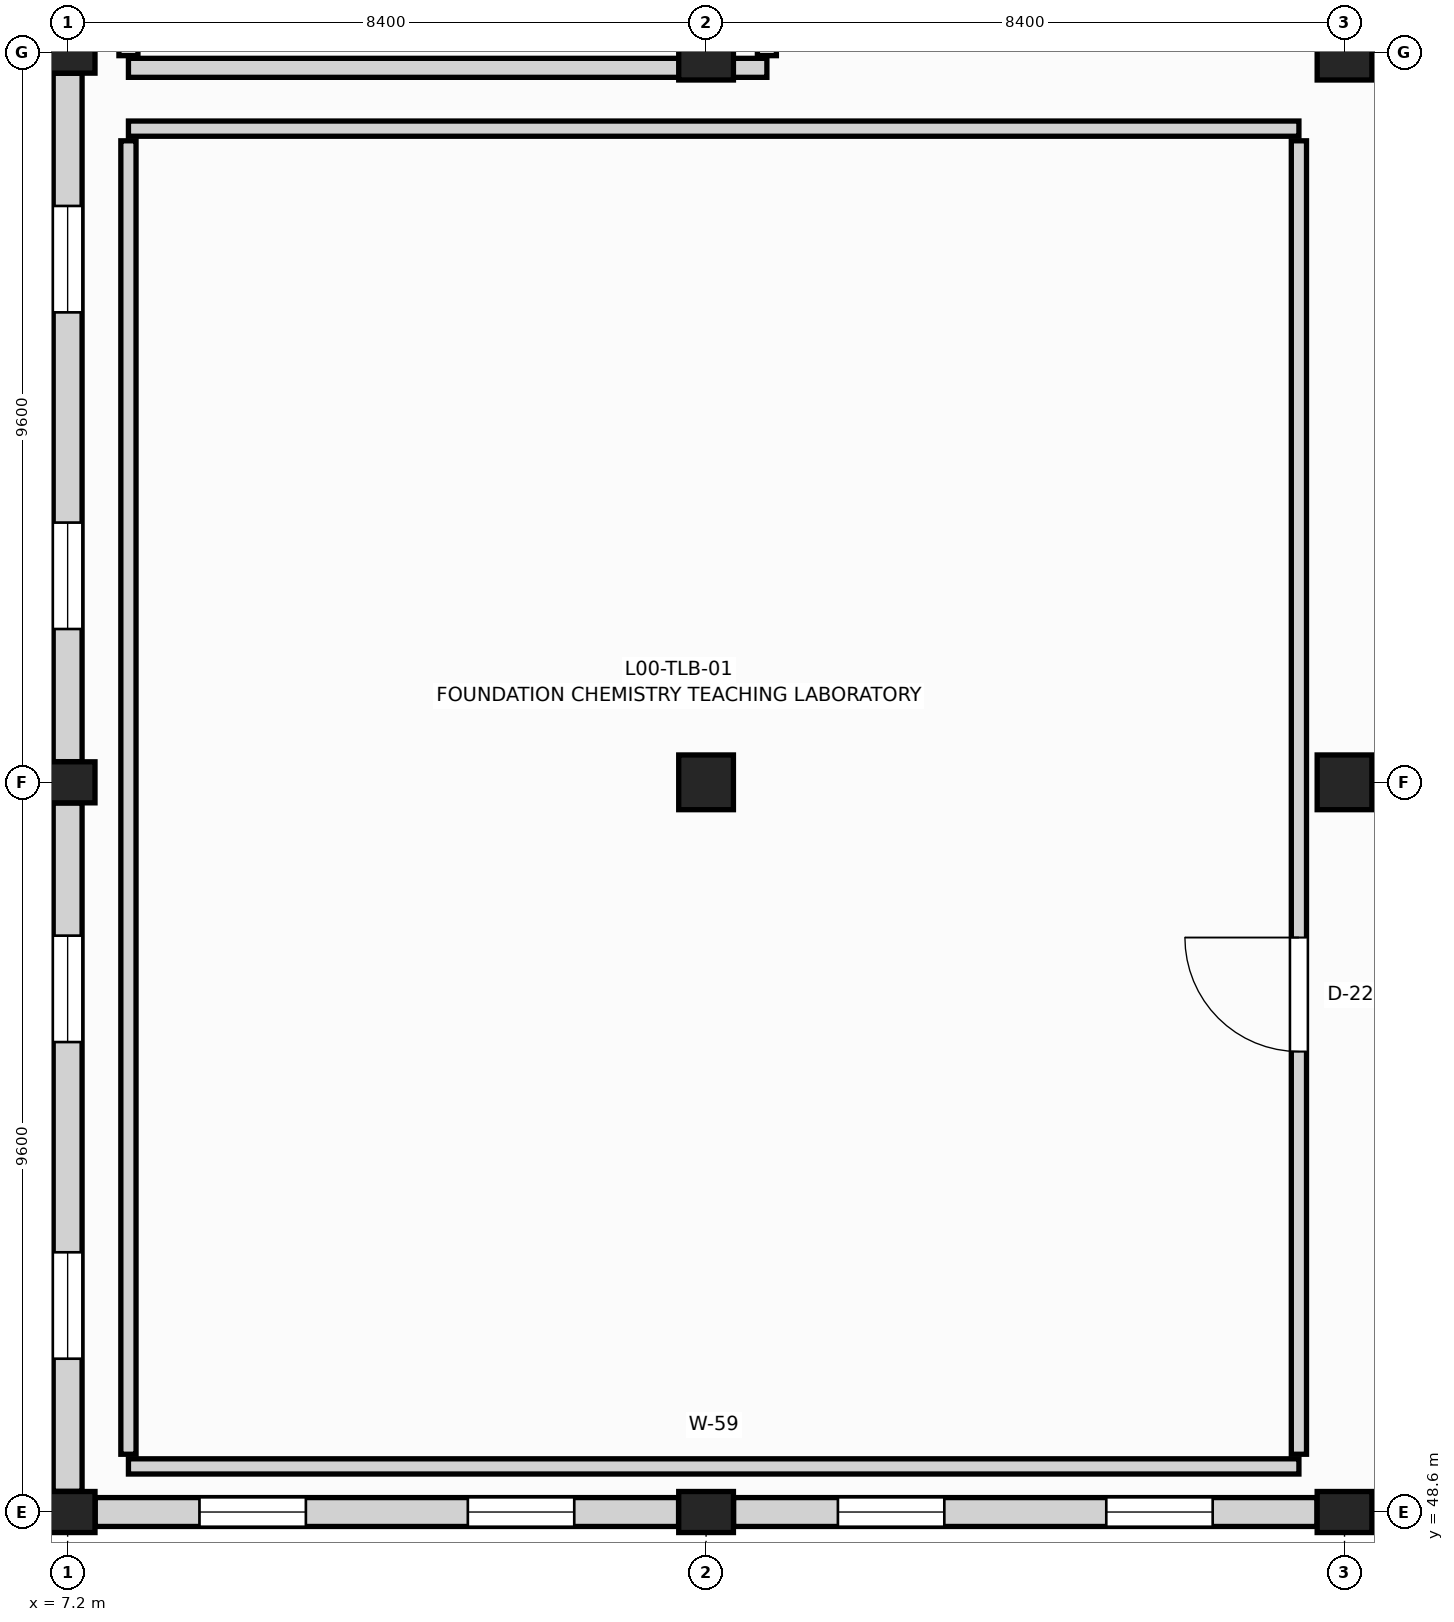
"""IFC4 building model, lengths in metres.
Left out: names, types, materials, properties, quantities, classifications, styles, units other than length and angle.
Written with IfcOpenShell. Run it as: python <this file> out.ifc"""

import sys

from ifc_helpers import new_model, si_unit, direction, frame, frame_2d, origin, origin_2d, place, context, subcontext, project, spatial, rectangle, extrude, element, fill, save


model = new_model("IFC4")
c1 = context("Model", 3, precision=1e-05, world=origin(), true_north=direction((0.0, 1.0)))
c2 = subcontext(c1, "Body", "Model", "MODEL_VIEW")
j1 = project(units=[si_unit("LENGTHUNIT", "METRE"), si_unit("PLANEANGLEUNIT", "RADIAN")], contexts=[c1])
p1 = place(None, origin())
s1 = spatial("IfcSite", under=j1, at=p1, CompositionType="ELEMENT")
p2 = place(p1, origin())
s2 = spatial("IfcBuilding", under=s1, at=p2, CompositionType="ELEMENT")
p3 = place(p2, origin())
s3 = spatial("IfcBuildingStorey", under=s2, at=p3, CompositionType="ELEMENT", Elevation=0.0)
for number, where, z_axis, x_axis in (
    (1, (7.2, 48.6, 0.0), (0.0, 0.0, 1.0), (1.0, 0.0, 0.0)),
    (2, (7.2, 58.2, 0.0), (0.0, 0.0, 1.0), (1.0, 0.0, 0.0)),
    (3, (7.2, 67.8, 0.0), (0.0, 0.0, 1.0), (1.0, 0.0, 0.0)),
    (4, (15.6, 48.6, 0.0), (0.0, 0.0, 1.0), (1.0, 0.0, 0.0)),
):
    element("IfcColumn", number, at=place(p3, frame(where, z_axis=z_axis, x_axis=x_axis)), inside=s3, PredefinedType="COLUMN", context=c2, shape_type="SweptSolid", body=[
        extrude(rectangle(XDim=0.72, YDim=0.54, at=origin_2d()), origin(), (0.0, 0.0, 1.0), 5.08),
    ])
for number, where, z_axis, x_axis in (
    (5, (15.6, 58.2, 0.0), (0.0, 0.0, 1.0), (1.0, 0.0, 0.0)),
    (6, (15.6, 67.8, 0.0), (0.0, 0.0, 1.0), (1.0, 0.0, 0.0)),
):
    element("IfcColumn", number, at=place(p3, frame(where, z_axis=z_axis, x_axis=x_axis)), inside=s3, PredefinedType="COLUMN", context=c2, shape_type="SweptSolid", body=[
        extrude(rectangle(XDim=0.72, YDim=0.72, at=origin_2d()), origin(), (0.0, 0.0, 1.0), 5.08),
    ])
p4 = place(p3, frame((24.0, 48.6, 0.0), z_axis=(0.0, 0.0, 1.0), x_axis=(1.0, 0.0, 0.0)))
e7 = element("IfcColumn", 7, at=p4, inside=s3, PredefinedType="COLUMN", context=c2, shape_type="SweptSolid", body=[
    extrude(rectangle(XDim=0.72, YDim=0.54, at=origin_2d()), origin(), (0.0, 0.0, 1.0), 5.08),
])
for number, where, z_axis, x_axis in (
    (8, (24.0, 58.2, 0.0), (0.0, 0.0, 1.0), (1.0, 0.0, 0.0)),
    (9, (24.0, 67.8, 0.0), (0.0, 0.0, 1.0), (1.0, 0.0, 0.0)),
):
    element("IfcColumn", number, at=place(p3, frame(where, z_axis=z_axis, x_axis=x_axis)), inside=s3, PredefinedType="COLUMN", context=c2, shape_type="SweptSolid", body=[
        extrude(rectangle(XDim=0.72, YDim=0.72, at=origin_2d()), origin(), (0.0, 0.0, 1.0), 5.08),
    ])
p5 = place(p3, frame((7.562, 48.6, 0.0), z_axis=(0.0, 0.0, 1.0), x_axis=(1.0, 0.0, 0.0)))
e10 = element("IfcWall", 10, at=p5, inside=s3, PredefinedType="SOLIDWALL", context=c2, shape_type="SweptSolid", body=[
    extrude(rectangle(XDim=7.676, YDim=0.38, at=frame_2d((3.838, 0.0))), origin(), (0.0, 0.0, 1.0), 4.28),
])
p6 = place(p5, frame((1.373, 0.0, 0.85)))
e11 = element("IfcOpeningElement", 11, at=p6, cuts=e10, PredefinedType="OPENING", context=c2, shape_type="SweptSolid", body=[
    extrude(rectangle(XDim=1.4, YDim=1.65, at=frame_2d((0.7, 0.825))), frame((0.0, 0.2, 0.0), z_axis=(0.0, -1.0, 0.0), x_axis=(1.0, 0.0, 0.0)), (0.0, 0.0, 1.0), 0.4),
])
p7 = place(p5, frame((4.904, 0.0, 0.85)))
e12 = element("IfcOpeningElement", 12, at=p7, cuts=e10, PredefinedType="OPENING", context=c2, shape_type="SweptSolid", body=[
    extrude(rectangle(XDim=1.4, YDim=1.65, at=frame_2d((0.7, 0.825))), frame((0.0, 0.2, 0.0), z_axis=(0.0, -1.0, 0.0), x_axis=(1.0, 0.0, 0.0)), (0.0, 0.0, 1.0), 0.4),
])
p8 = place(p3, frame((15.962, 48.6, 0.0), z_axis=(0.0, 0.0, 1.0), x_axis=(1.0, 0.0, 0.0)))
e13 = element("IfcWall", 13, at=p8, inside=s3, PredefinedType="SOLIDWALL", context=c2, shape_type="SweptSolid", body=[
    extrude(rectangle(XDim=7.676, YDim=0.38, at=frame_2d((3.838, 0.0))), origin(), (0.0, 0.0, 1.0), 4.28),
])
p9 = place(p8, frame((1.373, 0.0, 0.85)))
e14 = element("IfcOpeningElement", 14, at=p9, cuts=e13, PredefinedType="OPENING", context=c2, shape_type="SweptSolid", body=[
    extrude(rectangle(XDim=1.4, YDim=1.65, at=frame_2d((0.7, 0.825))), frame((0.0, 0.2, 0.0), z_axis=(0.0, -1.0, 0.0), x_axis=(1.0, 0.0, 0.0)), (0.0, 0.0, 1.0), 0.4),
])
p10 = place(p8, frame((4.904, 0.0, 0.85)))
e15 = element("IfcOpeningElement", 15, at=p10, cuts=e13, PredefinedType="OPENING", context=c2, shape_type="SweptSolid", body=[
    extrude(rectangle(XDim=1.4, YDim=1.65, at=frame_2d((0.7, 0.825))), frame((0.0, 0.2, 0.0), z_axis=(0.0, -1.0, 0.0), x_axis=(1.0, 0.0, 0.0)), (0.0, 0.0, 1.0), 0.4),
])
p11 = place(p3, frame((24.362, 48.6, 0.0), z_axis=(0.0, 0.0, 1.0), x_axis=(1.0, 0.0, 0.0)))
e16 = element("IfcWall", 16, at=p11, inside=s3, PredefinedType="SOLIDWALL", context=c2, shape_type="SweptSolid", body=[
    extrude(rectangle(XDim=7.676, YDim=0.38, at=frame_2d((3.838, 0.0))), origin(), (0.0, 0.0, 1.0), 4.28),
])
p12 = place(p11, frame((4.904, 0.0, 0.85)))
e17 = element("IfcOpeningElement", 17, at=p12, cuts=e16, PredefinedType="OPENING", context=c2, shape_type="SweptSolid", body=[
    extrude(rectangle(XDim=1.4, YDim=1.65, at=frame_2d((0.7, 0.825))), frame((0.0, 0.2, 0.0), z_axis=(0.0, -1.0, 0.0), x_axis=(1.0, 0.0, 0.0)), (0.0, 0.0, 1.0), 0.4),
])
p13 = place(p3, frame((7.2, 48.872, 0.0), z_axis=(0.0, 0.0, 1.0), x_axis=(0.0, 1.0, 0.0)))
e18 = element("IfcWall", 18, at=p13, inside=s3, PredefinedType="SOLIDWALL", context=c2, shape_type="SweptSolid", body=[
    extrude(rectangle(XDim=9.056, YDim=0.38, at=frame_2d((4.528, 0.0))), origin(), (0.0, 0.0, 1.0), 4.28),
])
p14 = place(p13, frame((1.745, 0.0, 0.85)))
e19 = element("IfcOpeningElement", 19, at=p14, cuts=e18, PredefinedType="OPENING", context=c2, shape_type="SweptSolid", body=[
    extrude(rectangle(XDim=1.4, YDim=1.65, at=frame_2d((0.7, 0.825))), frame((0.0, 0.2, 0.0), z_axis=(0.0, -1.0, 0.0), x_axis=(1.0, 0.0, 0.0)), (0.0, 0.0, 1.0), 0.4),
])
p15 = place(p13, frame((5.911, 0.0, 0.85)))
e20 = element("IfcOpeningElement", 20, at=p15, cuts=e18, PredefinedType="OPENING", context=c2, shape_type="SweptSolid", body=[
    extrude(rectangle(XDim=1.4, YDim=1.65, at=frame_2d((0.7, 0.825))), frame((0.0, 0.2, 0.0), z_axis=(0.0, -1.0, 0.0), x_axis=(1.0, 0.0, 0.0)), (0.0, 0.0, 1.0), 0.4),
])
p16 = place(p3, frame((7.2, 58.472, 0.0), z_axis=(0.0, 0.0, 1.0), x_axis=(0.0, 1.0, 0.0)))
e21 = element("IfcWall", 21, at=p16, inside=s3, PredefinedType="SOLIDWALL", context=c2, shape_type="SweptSolid", body=[
    extrude(rectangle(XDim=9.056, YDim=0.38, at=frame_2d((4.528, 0.0))), origin(), (0.0, 0.0, 1.0), 4.28),
])
p17 = place(p16, frame((1.745, 0.0, 0.85)))
e22 = element("IfcOpeningElement", 22, at=p17, cuts=e21, PredefinedType="OPENING", context=c2, shape_type="SweptSolid", body=[
    extrude(rectangle(XDim=1.4, YDim=1.65, at=frame_2d((0.7, 0.825))), frame((0.0, 0.2, 0.0), z_axis=(0.0, -1.0, 0.0), x_axis=(1.0, 0.0, 0.0)), (0.0, 0.0, 1.0), 0.4),
])
p18 = place(p16, frame((5.911, 0.0, 0.85)))
e23 = element("IfcOpeningElement", 23, at=p18, cuts=e21, PredefinedType="OPENING", context=c2, shape_type="SweptSolid", body=[
    extrude(rectangle(XDim=1.4, YDim=1.65, at=frame_2d((0.7, 0.825))), frame((0.0, 0.2, 0.0), z_axis=(0.0, -1.0, 0.0), x_axis=(1.0, 0.0, 0.0)), (0.0, 0.0, 1.0), 0.4),
])
for number, where, z_axis, x_axis in (
    (24, (8.0, 49.2, 0.0), (0.0, 0.0, 1.0), (1.0, 0.0, 0.0)),
    (25, (8.0, 66.8, 0.0), (0.0, 0.0, 1.0), (1.0, 0.0, 0.0)),
):
    element("IfcWall", number, at=place(p3, frame(where, z_axis=z_axis, x_axis=x_axis)), inside=s3, PredefinedType="PARTITIONING", context=c2, shape_type="SweptSolid", body=[
        extrude(rectangle(XDim=15.4, YDim=0.2, at=frame_2d((7.7, 0.0))), origin(), (0.0, 0.0, 1.0), 4.12),
    ])
p19 = place(p3, frame((8.0, 49.36, 0.0), z_axis=(0.0, 0.0, 1.0), x_axis=(0.0, 1.0, 0.0)))
e26 = element("IfcWall", 26, at=p19, inside=s3, PredefinedType="PARTITIONING", context=c2, shape_type="SweptSolid", body=[
    extrude(rectangle(XDim=17.28, YDim=0.2, at=frame_2d((8.64, 0.0))), origin(), (0.0, 0.0, 1.0), 4.12),
])
p20 = place(p3, frame((23.4, 49.36, 0.0), z_axis=(0.0, 0.0, 1.0), x_axis=(0.0, 1.0, 0.0)))
e27 = element("IfcWall", 27, at=p20, inside=s3, PredefinedType="PARTITIONING", context=c2, shape_type="SweptSolid", body=[
    extrude(rectangle(XDim=17.28, YDim=0.2, at=frame_2d((8.64, 0.0))), origin(), (0.0, 0.0, 1.0), 4.12),
])
p21 = place(p20, frame((5.298, 0.0, 0.0)))
e28 = element("IfcOpeningElement", 28, at=p21, cuts=e27, PredefinedType="OPENING", context=c2, shape_type="SweptSolid", body=[
    extrude(rectangle(XDim=1.5, YDim=2.2, at=frame_2d((0.75, 1.1))), frame((0.0, 0.11, 0.0), z_axis=(0.0, -1.0, 0.0), x_axis=(1.0, 0.0, 0.0)), (0.0, 0.0, 1.0), 0.22),
])
p22 = place(p3, frame((8.0, 67.6, 0.0), z_axis=(0.0, 0.0, 1.0), x_axis=(1.0, 0.0, 0.0)))
e29 = element("IfcWall", 29, at=p22, inside=s3, PredefinedType="PARTITIONING", context=c2, shape_type="SweptSolid", body=[
    extrude(rectangle(XDim=8.4, YDim=0.25, at=frame_2d((4.2, 0.0))), origin(), (0.0, 0.0, 1.0), 4.12),
])
p23 = place(p3, frame((8.0, 67.76, 0.0), z_axis=(0.0, 0.0, 1.0), x_axis=(0.0, 1.0, 0.0)))
e30 = element("IfcWall", 30, at=p23, inside=s3, PredefinedType="PARTITIONING", context=c2, shape_type="SweptSolid", body=[
    extrude(rectangle(XDim=18.28, YDim=0.25, at=frame_2d((9.14, 0.0))), origin(), (0.0, 0.0, 1.0), 4.12),
])
p24 = place(p3, frame((16.4, 67.76, 0.0), z_axis=(0.0, 0.0, 1.0), x_axis=(0.0, 1.0, 0.0)))
e31 = element("IfcWall", 31, at=p24, inside=s3, PredefinedType="PARTITIONING", context=c2, shape_type="SweptSolid", body=[
    extrude(rectangle(XDim=18.28, YDim=0.25, at=frame_2d((9.14, 0.0))), origin(), (0.0, 0.0, 1.0), 4.12),
])
p25 = place(p24, frame((5.598, 0.0, 0.0)))
e32 = element("IfcOpeningElement", 32, at=p25, cuts=e31, PredefinedType="OPENING", context=c2, shape_type="SweptSolid", body=[
    extrude(rectangle(XDim=1.6, YDim=2.3, at=frame_2d((0.8, 1.15))), frame((0.0, 0.135, 0.0), z_axis=(0.0, -1.0, 0.0), x_axis=(1.0, 0.0, 0.0)), (0.0, 0.0, 1.0), 0.27),
])
p26 = place(p6, origin())
e33 = element("IfcWindow", 33, at=p26, inside=s3, PartitioningType="SINGLE_PANEL", PredefinedType="WINDOW", context=c2, shape_type="SweptSolid", body=[
    extrude(rectangle(XDim=1.4, YDim=1.65, at=frame_2d((0.7, 0.825))), frame((0.0, 0.03, 0.0), z_axis=(0.0, -1.0, 0.0), x_axis=(1.0, 0.0, 0.0)), (0.0, 0.0, 1.0), 0.06),
])
fill(e11, e33)
p27 = place(p7, origin())
e34 = element("IfcWindow", 34, at=p27, inside=s3, PartitioningType="SINGLE_PANEL", PredefinedType="WINDOW", context=c2, shape_type="SweptSolid", body=[
    extrude(rectangle(XDim=1.4, YDim=1.65, at=frame_2d((0.7, 0.825))), frame((0.0, 0.03, 0.0), z_axis=(0.0, -1.0, 0.0), x_axis=(1.0, 0.0, 0.0)), (0.0, 0.0, 1.0), 0.06),
])
fill(e12, e34)
p28 = place(p9, origin())
e35 = element("IfcWindow", 35, at=p28, inside=s3, PartitioningType="SINGLE_PANEL", PredefinedType="WINDOW", context=c2, shape_type="SweptSolid", body=[
    extrude(rectangle(XDim=1.4, YDim=1.65, at=frame_2d((0.7, 0.825))), frame((0.0, 0.03, 0.0), z_axis=(0.0, -1.0, 0.0), x_axis=(1.0, 0.0, 0.0)), (0.0, 0.0, 1.0), 0.06),
])
fill(e14, e35)
p29 = place(p10, origin())
e36 = element("IfcWindow", 36, at=p29, inside=s3, PartitioningType="SINGLE_PANEL", PredefinedType="WINDOW", context=c2, shape_type="SweptSolid", body=[
    extrude(rectangle(XDim=1.4, YDim=1.65, at=frame_2d((0.7, 0.825))), frame((0.0, 0.03, 0.0), z_axis=(0.0, -1.0, 0.0), x_axis=(1.0, 0.0, 0.0)), (0.0, 0.0, 1.0), 0.06),
])
fill(e15, e36)
p30 = place(p14, origin())
e37 = element("IfcWindow", 37, at=p30, inside=s3, PartitioningType="SINGLE_PANEL", PredefinedType="WINDOW", context=c2, shape_type="SweptSolid", body=[
    extrude(rectangle(XDim=1.4, YDim=1.65, at=frame_2d((0.7, 0.825))), frame((0.0, 0.03, 0.0), z_axis=(0.0, -1.0, 0.0), x_axis=(1.0, 0.0, 0.0)), (0.0, 0.0, 1.0), 0.06),
])
fill(e19, e37)
p31 = place(p15, origin())
e38 = element("IfcWindow", 38, at=p31, inside=s3, PartitioningType="SINGLE_PANEL", PredefinedType="WINDOW", context=c2, shape_type="SweptSolid", body=[
    extrude(rectangle(XDim=1.4, YDim=1.65, at=frame_2d((0.7, 0.825))), frame((0.0, 0.03, 0.0), z_axis=(0.0, -1.0, 0.0), x_axis=(1.0, 0.0, 0.0)), (0.0, 0.0, 1.0), 0.06),
])
fill(e20, e38)
p32 = place(p17, origin())
e39 = element("IfcWindow", 39, at=p32, inside=s3, PartitioningType="SINGLE_PANEL", PredefinedType="WINDOW", context=c2, shape_type="SweptSolid", body=[
    extrude(rectangle(XDim=1.4, YDim=1.65, at=frame_2d((0.7, 0.825))), frame((0.0, 0.03, 0.0), z_axis=(0.0, -1.0, 0.0), x_axis=(1.0, 0.0, 0.0)), (0.0, 0.0, 1.0), 0.06),
])
fill(e22, e39)
p33 = place(p18, origin())
e40 = element("IfcWindow", 40, at=p33, inside=s3, PartitioningType="SINGLE_PANEL", PredefinedType="WINDOW", context=c2, shape_type="SweptSolid", body=[
    extrude(rectangle(XDim=1.4, YDim=1.65, at=frame_2d((0.7, 0.825))), frame((0.0, 0.03, 0.0), z_axis=(0.0, -1.0, 0.0), x_axis=(1.0, 0.0, 0.0)), (0.0, 0.0, 1.0), 0.06),
])
fill(e23, e40)
p34 = place(p21, origin())
e41 = element("IfcDoor", 41, at=p34, inside=s3, OperationType="SINGLE_SWING_RIGHT", PredefinedType="DOOR", context=c2, shape_type="SweptSolid", body=[
    extrude(rectangle(XDim=1.5, YDim=2.2, at=frame_2d((0.75, 1.1))), frame((0.0, 0.025, 0.0), z_axis=(0.0, -1.0, 0.0), x_axis=(1.0, 0.0, 0.0)), (0.0, 0.0, 1.0), 0.05),
])
fill(e28, e41)
save(model, sys.argv[1])
